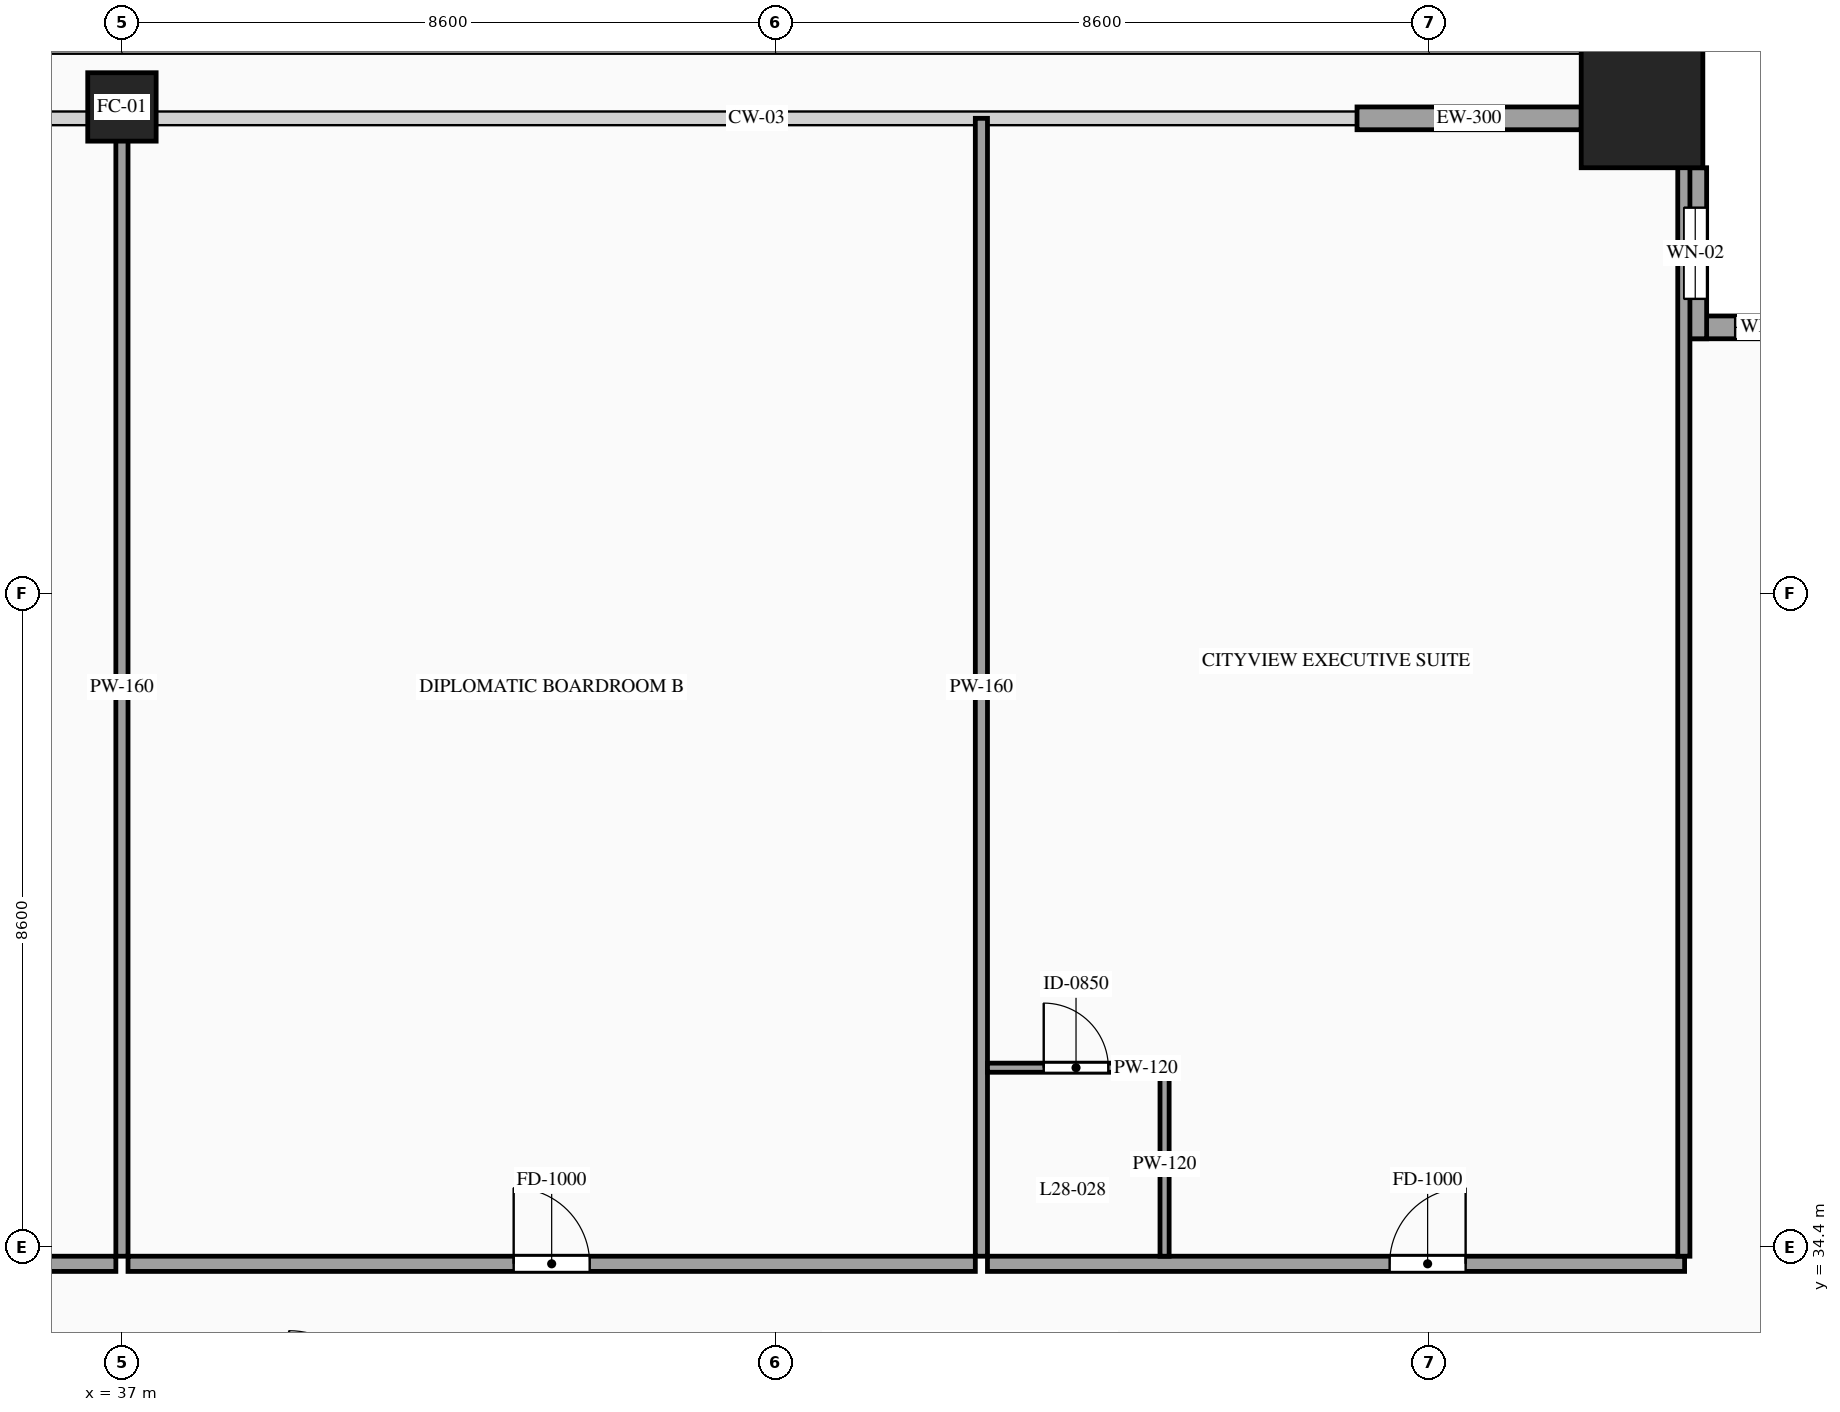
"""IFC4 building model, lengths in metres.
Left out: names, types, materials, properties, quantities, classifications, styles, units other than length and angle.
Written with IfcOpenShell. Run it as: python <this file> out.ifc"""

import sys

from ifc_helpers import new_model, si_unit, direction, frame, frame_2d, origin, origin_2d, place, context, subcontext, project, spatial, rectangle, hollow_rectangle, extrude, source, transform, mapped, element, fill, save


model = new_model("IFC4")
c1 = context("Model", 3, precision=1e-05, world=origin(), true_north=direction((0.0, 1.0)))
c2 = subcontext(c1, "Body", "Model", "MODEL_VIEW")
j1 = project(units=[si_unit("LENGTHUNIT", "METRE"), si_unit("PLANEANGLEUNIT", "RADIAN")], contexts=[c1])
p1 = place(None, origin())
s1 = spatial("IfcSite", under=j1, at=p1, CompositionType="ELEMENT")
p2 = place(p1, origin())
s2 = spatial("IfcBuilding", under=s1, at=p2, CompositionType="ELEMENT")
p3 = place(p2, frame((0.0, 0.0, 108.2)))
s3 = spatial("IfcBuildingStorey", under=s2, at=p3, CompositionType="ELEMENT", Elevation=108.2)
m1 = source(origin(), c2, "Body", "SweptSolid", [
    extrude(hollow_rectangle(XDim=0.9, YDim=0.9, WallThickness=0.042, at=origin_2d()), origin(), (0.0, 0.0, 1.0), 3.6),
])
p4 = place(p3, frame((37.0, 49.4, 0.0), z_axis=(0.0, 0.0, 1.0), x_axis=(1.0, 0.0, 0.0)))
e1 = element("IfcColumn", 1, at=p4, inside=s3, PredefinedType="COLUMN", context=c2, shape_type="MappedRepresentation", body=[
    mapped(m1, transform((0.0, 0.0, 0.0), scale=1.0)),
])
m2 = source(origin(), c2, "Body", "SweptSolid", [
    extrude(hollow_rectangle(XDim=1.6, YDim=1.6, WallThickness=0.07, at=origin_2d()), origin(), (0.0, 0.0, 1.0), 3.6),
])
p5 = place(p3, frame((57.0, 49.4, 0.0), z_axis=(0.0, 0.0, 1.0), x_axis=(1.0, 0.0, 0.0)))
e2 = element("IfcColumn", 2, at=p5, inside=s3, PredefinedType="COLUMN", context=c2, shape_type="MappedRepresentation", body=[
    mapped(m2, transform((0.0, 0.0, 0.0), scale=1.0)),
])
p6 = place(p3, frame((59.8, 46.5, 0.0), z_axis=(0.0, 0.0, 1.0), x_axis=(-1.0, 0.0, 0.0)))
e3 = element("IfcWall", 3, at=p6, inside=s3, PredefinedType="SOLIDWALL", context=c2, shape_type="SweptSolid", body=[
    extrude(rectangle(XDim=2.25, YDim=0.3, at=frame_2d((1.125, 0.0))), origin(), (0.0, 0.0, 1.0), 3.38),
])
p7 = place(p6, frame((0.675, 0.0, 0.85)))
e4 = element("IfcOpeningElement", 4, at=p7, cuts=e3, PredefinedType="OPENING", context=c2, shape_type="SweptSolid", body=[
    extrude(rectangle(XDim=0.9, YDim=1.5, at=frame_2d((0.45, 0.75))), frame((0.0, 0.165, 0.0), z_axis=(0.0, -1.0, 0.0), x_axis=(1.0, 0.0, 0.0)), (0.0, 0.0, 1.0), 0.33),
])
p8 = place(p3, frame((57.7, 46.35, 0.0), z_axis=(0.0, 0.0, 1.0), x_axis=(0.0, 1.0, 0.0)))
e5 = element("IfcWall", 5, at=p8, inside=s3, PredefinedType="SOLIDWALL", context=c2, shape_type="SweptSolid", body=[
    extrude(rectangle(XDim=2.25, YDim=0.3, at=frame_2d((1.125, 0.0))), origin(), (0.0, 0.0, 1.0), 3.38),
])
p9 = place(p8, frame((0.525, 0.0, 0.85)))
e6 = element("IfcOpeningElement", 6, at=p9, cuts=e5, PredefinedType="OPENING", context=c2, shape_type="SweptSolid", body=[
    extrude(rectangle(XDim=1.2, YDim=2.1, at=frame_2d((0.6, 1.05))), frame((0.0, 0.165, 0.0), z_axis=(0.0, -1.0, 0.0), x_axis=(1.0, 0.0, 0.0)), (0.0, 0.0, 1.0), 0.33),
])
m3 = source(origin(), c2, "Body", "SweptSolid", [
    extrude(rectangle(XDim=2.95, YDim=0.3, at=frame_2d((1.475, 0.0))), origin(), (0.0, 0.0, 1.0), 2.775),
])
p10 = place(p3, frame((53.25, 49.25, 0.0), z_axis=(0.0, 0.0, 1.0), x_axis=(1.0, 0.0, 0.0)))
e7 = element("IfcWall", 7, at=p10, inside=s3, PredefinedType="SOLIDWALL", context=c2, shape_type="MappedRepresentation", body=[
    mapped(m3, transform((0.0, 0.0, 0.0), scale=1.0)),
])
p11 = place(p3, frame((27.828, 34.18, 0.0), z_axis=(0.0, 0.0, 1.0), x_axis=(1.0, 0.0, 0.0)))
e8 = element("IfcWall", 8, at=p11, inside=s3, PredefinedType="PARTITIONING", context=c2, shape_type="SweptSolid", body=[
    extrude(rectangle(XDim=9.092, YDim=0.2, at=frame_2d((4.546, 0.0))), origin(), (0.0, 0.0, 1.0), 3.38),
])
p12 = place(p11, frame((4.046, 0.0, 0.0)))
e9 = element("IfcOpeningElement", 9, at=p12, cuts=e8, PredefinedType="OPENING", context=c2, shape_type="SweptSolid", body=[
    extrude(rectangle(XDim=1.0, YDim=2.2, at=frame_2d((0.5, 1.1))), frame((0.0, 0.115, 0.0), z_axis=(0.0, -1.0, 0.0), x_axis=(1.0, 0.0, 0.0)), (0.0, 0.0, 1.0), 0.23),
])
m4 = source(origin(), c2, "Body", "SweptSolid", [
    extrude(rectangle(XDim=14.97, YDim=0.16, at=frame_2d((7.485, 0.0))), origin(), (0.0, 0.0, 1.0), 2.675),
])
p13 = place(p3, frame((37.0, 34.28, 0.0), z_axis=(0.0, 0.0, 1.0), x_axis=(0.0, 1.0, 0.0)))
e10 = element("IfcWall", 10, at=p13, inside=s3, PredefinedType="PARTITIONING", context=c2, shape_type="MappedRepresentation", body=[
    mapped(m4, transform((0.0, 0.0, 0.0), scale=1.0)),
])
p14 = place(p3, frame((37.08, 34.18, 0.0), z_axis=(0.0, 0.0, 1.0), x_axis=(1.0, 0.0, 0.0)))
e11 = element("IfcWall", 11, at=p14, inside=s3, PredefinedType="PARTITIONING", context=c2, shape_type="SweptSolid", body=[
    extrude(rectangle(XDim=11.148, YDim=0.2, at=frame_2d((5.574, 0.0))), origin(), (0.0, 0.0, 1.0), 3.38),
])
p15 = place(p14, frame((5.074, 0.0, 0.0)))
e12 = element("IfcOpeningElement", 12, at=p15, cuts=e11, PredefinedType="OPENING", context=c2, shape_type="SweptSolid", body=[
    extrude(rectangle(XDim=1.0, YDim=2.2, at=frame_2d((0.5, 1.1))), frame((0.0, 0.115, 0.0), z_axis=(0.0, -1.0, 0.0), x_axis=(1.0, 0.0, 0.0)), (0.0, 0.0, 1.0), 0.23),
])
m5 = source(origin(), c2, "Body", "SweptSolid", [
    extrude(rectangle(XDim=14.97, YDim=0.16, at=frame_2d((7.485, 0.0))), origin(), (0.0, 0.0, 1.0), 3.38),
])
p16 = place(p3, frame((48.308, 34.28, 0.0), z_axis=(0.0, 0.0, 1.0), x_axis=(0.0, 1.0, 0.0)))
e13 = element("IfcWall", 13, at=p16, inside=s3, PredefinedType="PARTITIONING", context=c2, shape_type="MappedRepresentation", body=[
    mapped(m5, transform((0.0, 0.0, 0.0), scale=1.0)),
])
p17 = place(p3, frame((48.388, 34.18, 0.0), z_axis=(0.0, 0.0, 1.0), x_axis=(1.0, 0.0, 0.0)))
e14 = element("IfcWall", 14, at=p17, inside=s3, PredefinedType="PARTITIONING", context=c2, shape_type="SweptSolid", body=[
    extrude(rectangle(XDim=9.172, YDim=0.2, at=frame_2d((4.586, 0.0))), origin(), (0.0, 0.0, 1.0), 3.38),
])
p18 = place(p17, frame((5.291, 0.0, 0.0)))
e15 = element("IfcOpeningElement", 15, at=p18, cuts=e14, PredefinedType="OPENING", context=c2, shape_type="SweptSolid", body=[
    extrude(rectangle(XDim=1.0, YDim=2.2, at=frame_2d((0.5, 1.1))), frame((0.0, 0.115, 0.0), z_axis=(0.0, -1.0, 0.0), x_axis=(1.0, 0.0, 0.0)), (0.0, 0.0, 1.0), 0.23),
])
m6 = source(origin(), c2, "Body", "SweptSolid", [
    extrude(rectangle(XDim=14.82, YDim=0.16, at=frame_2d((7.41, 0.0))), origin(), (0.0, 0.0, 1.0), 3.38),
])
p19 = place(p3, frame((57.55, 34.28, 0.0), z_axis=(0.0, 0.0, 1.0), x_axis=(0.0, 1.0, 0.0)))
e16 = element("IfcWall", 16, at=p19, inside=s3, PredefinedType="PARTITIONING", context=c2, shape_type="MappedRepresentation", body=[
    mapped(m6, transform((0.0, 0.0, 0.0), scale=1.0)),
])
p20 = place(p3, frame((48.388, 36.76, 0.0), z_axis=(0.0, 0.0, 1.0), x_axis=(1.0, 0.0, 0.0)))
e17 = element("IfcWall", 17, at=p20, inside=s3, PredefinedType="PARTITIONING", context=c2, shape_type="SweptSolid", body=[
    extrude(rectangle(XDim=2.33, YDim=0.12, at=frame_2d((1.165, 0.0))), origin(), (0.0, 0.0, 1.0), 3.38),
])
p21 = place(p20, frame((0.74, 0.0, 0.0)))
e18 = element("IfcOpeningElement", 18, at=p21, cuts=e17, PredefinedType="OPENING", context=c2, shape_type="SweptSolid", body=[
    extrude(rectangle(XDim=0.85, YDim=2.1, at=frame_2d((0.425, 1.05))), frame((0.0, 0.075, 0.0), z_axis=(0.0, -1.0, 0.0), x_axis=(1.0, 0.0, 0.0)), (0.0, 0.0, 1.0), 0.15),
])
m7 = source(origin(), c2, "Body", "SweptSolid", [
    extrude(rectangle(XDim=2.42, YDim=0.12, at=frame_2d((1.21, 0.0))), origin(), (0.0, 0.0, 1.0), 3.38),
])
p22 = place(p3, frame((50.718, 34.28, 0.0), z_axis=(0.0, 0.0, 1.0), x_axis=(0.0, 1.0, 0.0)))
e19 = element("IfcWall", 19, at=p22, inside=s3, PredefinedType="PARTITIONING", context=c2, shape_type="MappedRepresentation", body=[
    mapped(m7, transform((0.0, 0.0, 0.0), scale=1.0)),
])
m8 = source(origin(), c2, "Body", "SweptSolid", [
    extrude(rectangle(XDim=0.9, YDim=1.5, at=frame_2d((0.45, 0.75))), frame((0.0, 0.03, 0.0), z_axis=(0.0, -1.0, 0.0), x_axis=(1.0, 0.0, 0.0)), (0.0, 0.0, 1.0), 0.06),
])
p23 = place(p7, origin())
e20 = element("IfcWindow", 20, at=p23, inside=s3, PartitioningType="SINGLE_PANEL", PredefinedType="WINDOW", context=c2, shape_type="MappedRepresentation", body=[
    mapped(m8, transform((0.0, 0.0, 0.0), scale=1.0)),
])
fill(e4, e20)
m9 = source(origin(), c2, "Body", "SweptSolid", [
    extrude(rectangle(XDim=1.2, YDim=2.1, at=frame_2d((0.6, 1.05))), frame((0.0, 0.03, 0.0), z_axis=(0.0, -1.0, 0.0), x_axis=(1.0, 0.0, 0.0)), (0.0, 0.0, 1.0), 0.06),
])
p24 = place(p9, origin())
e21 = element("IfcWindow", 21, at=p24, inside=s3, PartitioningType="SINGLE_PANEL", PredefinedType="WINDOW", context=c2, shape_type="MappedRepresentation", body=[
    mapped(m9, transform((0.0, 0.0, 0.0), scale=1.0)),
])
fill(e6, e21)
m10 = source(origin(), c2, "Body", "SweptSolid", [
    extrude(rectangle(XDim=1.0, YDim=2.2, at=frame_2d((0.5, 1.1))), frame((0.0, 0.025, 0.0), z_axis=(0.0, -1.0, 0.0), x_axis=(1.0, 0.0, 0.0)), (0.0, 0.0, 1.0), 0.05),
])
p25 = place(p15, origin())
e22 = element("IfcDoor", 22, at=p25, inside=s3, OperationType="SINGLE_SWING_LEFT", PredefinedType="DOOR", context=c2, shape_type="MappedRepresentation", body=[
    mapped(m10, transform((0.0, 0.0, 0.0), scale=1.0)),
])
fill(e12, e22)
p26 = place(p18, origin())
e23 = element("IfcDoor", 23, at=p26, inside=s3, OperationType="SINGLE_SWING_RIGHT", PredefinedType="DOOR", context=c2, shape_type="MappedRepresentation", body=[
    mapped(m10, transform((0.0, 0.0, 0.0), scale=1.0)),
])
fill(e15, e23)
m11 = source(origin(), c2, "Body", "SweptSolid", [
    extrude(rectangle(XDim=0.85, YDim=2.1, at=frame_2d((0.425, 1.05))), frame((0.0, 0.025, 0.0), z_axis=(0.0, -1.0, 0.0), x_axis=(1.0, 0.0, 0.0)), (0.0, 0.0, 1.0), 0.05),
])
p27 = place(p21, origin())
e24 = element("IfcDoor", 24, at=p27, inside=s3, OperationType="SINGLE_SWING_LEFT", PredefinedType="DOOR", context=c2, shape_type="MappedRepresentation", body=[
    mapped(m11, transform((0.0, 0.0, 0.0), scale=1.0)),
])
fill(e18, e24)
save(model, sys.argv[1])
